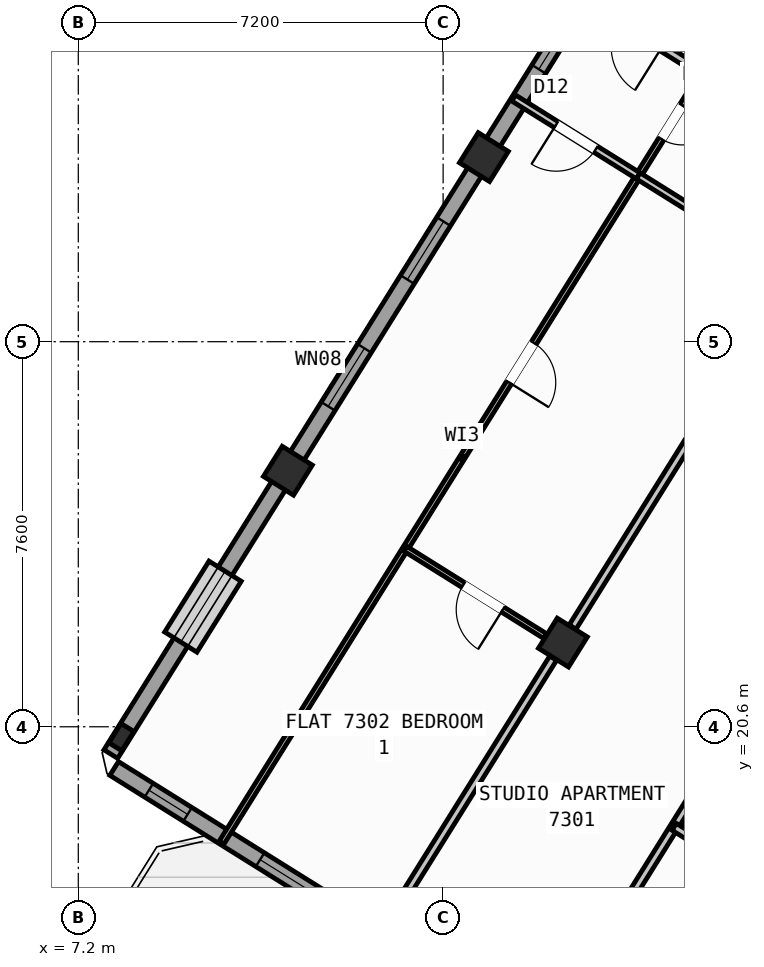
"""IFC4 building model, lengths in metres.
Left out: names, types, materials, properties, quantities, classifications, styles, units other than length and angle.
Written with IfcOpenShell. Run it as: python <this file> out.ifc"""

import sys

from ifc_helpers import new_model, si_unit, direction, frame, frame_2d, origin, origin_2d, place, context, subcontext, project, spatial, rectangle, hollow_rectangle, i_section, extrude, source, transform, mapped, element, fill, save


model = new_model("IFC4")
c1 = context("Model", 3, precision=1e-05, world=origin(), true_north=direction((0.0, 1.0)))
c2 = subcontext(c1, "Body", "Model", "MODEL_VIEW")
j1 = project(units=[si_unit("LENGTHUNIT", "METRE"), si_unit("PLANEANGLEUNIT", "RADIAN")], contexts=[c1])
p1 = place(None, origin())
s1 = spatial("IfcSite", under=j1, at=p1, CompositionType="ELEMENT")
p2 = place(p1, origin())
s2 = spatial("IfcBuilding", under=s1, at=p2, CompositionType="ELEMENT")
p3 = place(p2, frame((0.0, 0.0, 288.0)))
s3 = spatial("IfcBuildingStorey", under=s2, at=p3, CompositionType="ELEMENT", Elevation=288.0)
m1 = source(origin(), c2, "Body", "SweptSolid", [
    extrude(hollow_rectangle(XDim=0.7, YDim=0.7, WallThickness=0.028, at=origin_2d()), origin(), (0.0, 0.0, 1.0), 3.6),
])
for number, where, z_axis, x_axis in (
    (1, (16.764, 22.261, 0.0), (0.0, 0.0, 1.0), (-0.848, 0.53, 0.0)),
    (2, (15.205, 31.844, 0.0), (0.0, 0.0, 1.0), (-0.848, 0.53, 0.0)),
    (3, (11.336, 25.653, 0.0), (0.0, 0.0, 1.0), (-0.848, 0.53, 0.0)),
):
    element("IfcColumn", number, at=place(p3, frame(where, z_axis=z_axis, x_axis=x_axis)), inside=s3, PredefinedType="COLUMN", context=c2, shape_type="MappedRepresentation", body=[
        mapped(m1, transform((0.0, 0.0, 0.0), scale=1.0)),
    ])
m2 = source(origin(), c2, "Body", "SweptSolid", [
    extrude(i_section(OverallWidth=0.3, OverallDepth=0.45, WebThickness=0.014, FlangeThickness=0.026, at=origin_2d()), origin(), (0.0, 0.0, 1.0), 3.6),
])
p4 = place(p3, frame((8.051, 20.395, 0.0), z_axis=(0.0, 0.0, 1.0), x_axis=(-0.848048096156, 0.529919264233, 0.0)))
e4 = element("IfcColumn", 4, at=p4, inside=s3, PredefinedType="COLUMN", context=c2, shape_type="MappedRepresentation", body=[
    mapped(m2, transform((0.0, 0.0, 0.0), scale=1.0)),
])
p5 = place(p3, frame((29.268, 6.429, 0.0), z_axis=(0.0, 0.0, 1.0), x_axis=(-0.848048398186, 0.529918780885, 0.0)))
e5 = element("IfcWall", 5, at=p5, inside=s3, PredefinedType="STANDARD", context=c2, shape_type="SweptSolid", body=[
    extrude(rectangle(XDim=25.188, YDim=0.32, at=frame_2d((12.594, 0.0))), origin(), (0.0, 0.0, 1.0), 3.35),
])
p6 = place(p5, frame((16.362, 0.0, 0.0)))
e6 = element("IfcOpeningElement", 6, at=p6, cuts=e5, PredefinedType="OPENING", context=c2, shape_type="SweptSolid", body=[
    extrude(rectangle(XDim=1.2, YDim=2.15, at=frame_2d((0.6, 1.075))), frame((0.0, 0.17, 0.0), z_axis=(0.0, -1.0, 0.0), x_axis=(1.0, 0.0, 0.0)), (0.0, 0.0, 1.0), 0.34),
])
p7 = place(p5, frame((3.859, 0.0, 0.9)))
e7 = element("IfcOpeningElement", 7, at=p7, cuts=e5, PredefinedType="OPENING", context=c2, shape_type="SweptSolid", body=[
    extrude(rectangle(XDim=1.65, YDim=1.45, at=frame_2d((0.825, 0.725))), frame((0.0, 0.17, 0.0), z_axis=(0.0, -1.0, 0.0), x_axis=(1.0, 0.0, 0.0)), (0.0, 0.0, 1.0), 0.34),
])
p8 = place(p5, frame((10.519, 0.0, 0.9)))
e8 = element("IfcOpeningElement", 8, at=p8, cuts=e5, PredefinedType="OPENING", context=c2, shape_type="SweptSolid", body=[
    extrude(rectangle(XDim=1.65, YDim=1.45, at=frame_2d((0.825, 0.725))), frame((0.0, 0.17, 0.0), z_axis=(0.0, -1.0, 0.0), x_axis=(1.0, 0.0, 0.0)), (0.0, 0.0, 1.0), 0.34),
])
p9 = place(p5, frame((19.841, 0.0, 0.95)))
e9 = element("IfcOpeningElement", 9, at=p9, cuts=e5, PredefinedType="OPENING", context=c2, shape_type="SweptSolid", body=[
    extrude(rectangle(XDim=1.95, YDim=1.35, at=frame_2d((0.975, 0.675))), frame((0.0, 0.17, 0.0), z_axis=(0.0, -1.0, 0.0), x_axis=(1.0, 0.0, 0.0)), (0.0, 0.0, 1.0), 0.34),
])
p10 = place(p5, frame((23.478, 0.0, 1.0)))
e10 = element("IfcOpeningElement", 10, at=p10, cuts=e5, PredefinedType="OPENING", context=c2, shape_type="SweptSolid", body=[
    extrude(rectangle(XDim=0.9, YDim=1.25, at=frame_2d((0.45, 0.625))), frame((0.0, 0.17, 0.0), z_axis=(0.0, -1.0, 0.0), x_axis=(1.0, 0.0, 0.0)), (0.0, 0.0, 1.0), 0.34),
])
p11 = place(p3, frame((7.842, 20.061, 0.0), z_axis=(0.0, 0.0, 1.0), x_axis=(0.529915577903, 0.84805039962, 0.0)))
e11 = element("IfcWall", 11, at=p11, inside=s3, PredefinedType="STANDARD", context=c2, shape_type="SweptSolid", body=[
    extrude(rectangle(XDim=21.587, YDim=0.32, at=frame_2d((10.794, 0.0))), origin(), (0.0, 0.0, 1.0), 2.875),
])
p12 = place(p11, frame((2.606, 0.0, 0.9)))
e12 = element("IfcOpeningElement", 12, at=p12, cuts=e11, PredefinedType="OPENING", context=c2, shape_type="SweptSolid", body=[
    extrude(rectangle(XDim=1.65, YDim=1.45, at=frame_2d((0.825, 0.725))), frame((0.0, 0.17, 0.0), z_axis=(0.0, -1.0, 0.0), x_axis=(1.0, 0.0, 0.0)), (0.0, 0.0, 1.0), 0.34),
])
p13 = place(p11, frame((8.094, 0.0, 0.9)))
e13 = element("IfcOpeningElement", 13, at=p13, cuts=e11, PredefinedType="OPENING", context=c2, shape_type="SweptSolid", body=[
    extrude(rectangle(XDim=1.35, YDim=1.45, at=frame_2d((0.675, 0.725))), frame((0.0, 0.17, 0.0), z_axis=(0.0, -1.0, 0.0), x_axis=(1.0, 0.0, 0.0)), (0.0, 0.0, 1.0), 0.34),
])
p14 = place(p11, frame((11.044, 0.0, 0.9)))
e14 = element("IfcOpeningElement", 14, at=p14, cuts=e11, PredefinedType="OPENING", context=c2, shape_type="SweptSolid", body=[
    extrude(rectangle(XDim=1.35, YDim=1.45, at=frame_2d((0.675, 0.725))), frame((0.0, 0.17, 0.0), z_axis=(0.0, -1.0, 0.0), x_axis=(1.0, 0.0, 0.0)), (0.0, 0.0, 1.0), 0.34),
])
p15 = place(p11, frame((15.939, 0.0, 1.0)))
e15 = element("IfcOpeningElement", 15, at=p15, cuts=e11, PredefinedType="OPENING", context=c2, shape_type="SweptSolid", body=[
    extrude(rectangle(XDim=0.9, YDim=1.25, at=frame_2d((0.45, 0.625))), frame((0.0, 0.17, 0.0), z_axis=(0.0, -1.0, 0.0), x_axis=(1.0, 0.0, 0.0)), (0.0, 0.0, 1.0), 0.34),
])
p16 = place(p3, frame((21.206, 17.292, 0.0), z_axis=(0.0, 0.0, 1.0), x_axis=(-0.848050851465, 0.529914854792, 0.0)))
e16 = element("IfcWall", 16, at=p16, inside=s3, PredefinedType="PARTITIONING", context=c2, shape_type="SweptSolid", body=[
    extrude(rectangle(XDim=2.61, YDim=0.16, at=frame_2d((1.305, 0.0))), origin(), (0.0, 0.0, 1.0), 3.34),
])
p17 = place(p3, frame((25.807, 29.582, 0.0), z_axis=(0.0, 0.0, 1.0), x_axis=(-0.529918119251, -0.84804881162, 0.0)))
e17 = element("IfcWall", 17, at=p17, inside=s3, PredefinedType="PARTITIONING", context=c2, shape_type="SweptSolid", body=[
    extrude(rectangle(XDim=17.65, YDim=0.16, at=frame_2d((8.825, 0.0))), origin(), (0.0, 0.0, 1.0), 3.34),
])
p18 = place(p3, frame((26.973, 31.447, 0.0), z_axis=(0.0, 0.0, 1.0), x_axis=(-0.84805406617, 0.529909710094, 0.0)))
e18 = element("IfcWall", 18, at=p18, inside=s3, PredefinedType="PARTITIONING", context=c2, shape_type="SweptSolid", body=[
    extrude(rectangle(XDim=10.33, YDim=0.16, at=frame_2d((5.165, 0.0))), origin(), (0.0, 0.0, 1.0), 3.34),
])
p19 = place(p18, frame((1.459, 0.0, 0.0)))
e19 = element("IfcOpeningElement", 19, at=p19, cuts=e18, PredefinedType="OPENING", context=c2, shape_type="SweptSolid", body=[
    extrude(rectangle(XDim=1.0, YDim=2.1, at=frame_2d((0.5, 1.05))), frame((0.0, 0.09, 0.0), z_axis=(0.0, -1.0, 0.0), x_axis=(1.0, 0.0, 0.0)), (0.0, 0.0, 1.0), 0.18),
])
p20 = place(p18, frame((6.614, 0.0, 0.0)))
e20 = element("IfcOpeningElement", 20, at=p20, cuts=e18, PredefinedType="OPENING", context=c2, shape_type="SweptSolid", body=[
    extrude(rectangle(XDim=1.0, YDim=2.1, at=frame_2d((0.5, 1.05))), frame((0.0, 0.09, 0.0), z_axis=(0.0, -1.0, 0.0), x_axis=(1.0, 0.0, 0.0)), (0.0, 0.0, 1.0), 0.18),
])
p21 = place(p3, frame((25.807, 29.582, 0.0), z_axis=(0.0, 0.0, 1.0), x_axis=(-0.848060702647, 0.529899089097, 0.0)))
e21 = element("IfcWall", 21, at=p21, inside=s3, PredefinedType="PARTITIONING", context=c2, shape_type="SweptSolid", body=[
    extrude(rectangle(XDim=10.33, YDim=0.16, at=frame_2d((5.165, 0.0))), origin(), (0.0, 0.0, 1.0), 3.34),
])
p22 = place(p21, frame((2.22, 0.0, 0.0)))
e22 = element("IfcOpeningElement", 22, at=p22, cuts=e21, PredefinedType="OPENING", context=c2, shape_type="SweptSolid", body=[
    extrude(rectangle(XDim=0.86, YDim=2.05, at=frame_2d((0.43, 1.025))), frame((0.0, 0.09, 0.0), z_axis=(0.0, -1.0, 0.0), x_axis=(1.0, 0.0, 0.0)), (0.0, 0.0, 1.0), 0.18),
])
p23 = place(p21, frame((8.36, 0.0, 0.0)))
e23 = element("IfcOpeningElement", 23, at=p23, cuts=e21, PredefinedType="OPENING", context=c2, shape_type="SweptSolid", body=[
    extrude(rectangle(XDim=1.0, YDim=2.1, at=frame_2d((0.5, 1.05))), frame((0.0, 0.09, 0.0), z_axis=(0.0, -1.0, 0.0), x_axis=(1.0, 0.0, 0.0)), (0.0, 0.0, 1.0), 0.18),
])
p24 = place(p3, frame((20.44, 28.145, 0.0), z_axis=(0.0, 0.0, 1.0), x_axis=(-0.529938869374, -0.84803584519, 0.0)))
e24 = element("IfcWall", 24, at=p24, inside=s3, PredefinedType="PARTITIONING", context=c2, shape_type="SweptSolid", body=[
    extrude(rectangle(XDim=6.576, YDim=0.16, at=frame_2d((3.288, 0.0))), origin(), (0.0, 0.0, 1.0), 2.875),
])
p25 = place(p3, frame((16.572, 21.954, 0.0), z_axis=(0.0, 0.0, 1.0), x_axis=(-0.529904903214, -0.848057069748, 0.0)))
e25 = element("IfcWall", 25, at=p25, inside=s3, PredefinedType="PARTITIONING", context=c2, shape_type="SweptSolid", body=[
    extrude(rectangle(XDim=5.601, YDim=0.16, at=frame_2d((2.801, 0.0))), origin(), (0.0, 0.0, 1.0), 2.875),
])
p26 = place(p3, frame((19.523, 33.508, 0.0), z_axis=(0.0, 0.0, 1.0), x_axis=(-0.529910765222, -0.848053406869, 0.0)))
e26 = element("IfcWall", 26, at=p26, inside=s3, PredefinedType="PARTITIONING", context=c2, shape_type="SweptSolid", body=[
    extrude(rectangle(XDim=17.92, YDim=0.11, at=frame_2d((8.96, 0.0))), origin(), (0.0, 0.0, 1.0), 3.34),
])
p27 = place(p26, frame((0.76, 0.0, 0.0)))
e27 = element("IfcOpeningElement", 27, at=p27, cuts=e26, PredefinedType="OPENING", context=c2, shape_type="SweptSolid", body=[
    extrude(rectangle(XDim=0.78, YDim=2.05, at=frame_2d((0.39, 1.025))), frame((0.0, 0.065, 0.0), z_axis=(0.0, -1.0, 0.0), x_axis=(1.0, 0.0, 0.0)), (0.0, 0.0, 1.0), 0.13),
])
p28 = place(p26, frame((6.289, 0.0, 0.0)))
e28 = element("IfcOpeningElement", 28, at=p28, cuts=e26, PredefinedType="OPENING", context=c2, shape_type="SweptSolid", body=[
    extrude(rectangle(XDim=0.92, YDim=2.08, at=frame_2d((0.46, 1.04))), frame((0.0, 0.065, 0.0), z_axis=(0.0, -1.0, 0.0), x_axis=(1.0, 0.0, 0.0)), (0.0, 0.0, 1.0), 0.13),
])
p29 = place(p3, frame((18.251, 31.473, 0.0), z_axis=(0.0, 0.0, 1.0), x_axis=(-0.848059786386, 0.529900555496, 0.0)))
e29 = element("IfcWall", 29, at=p29, inside=s3, PredefinedType="PLUMBINGWALL", context=c2, shape_type="SweptSolid", body=[
    extrude(rectangle(XDim=2.9, YDim=0.14, at=frame_2d((1.45, 0.0))), origin(), (0.0, 0.0, 1.0), 3.34),
])
p30 = place(p29, frame((0.99, 0.0, 0.0)))
e30 = element("IfcOpeningElement", 30, at=p30, cuts=e29, PredefinedType="OPENING", context=c2, shape_type="SweptSolid", body=[
    extrude(rectangle(XDim=0.92, YDim=2.08, at=frame_2d((0.46, 1.04))), frame((0.0, 0.08, 0.0), z_axis=(0.0, -1.0, 0.0), x_axis=(1.0, 0.0, 0.0)), (0.0, 0.0, 1.0), 0.16),
])
p31 = place(p3, frame((21.321, 29.554, 0.0), z_axis=(0.0, 0.0, 1.0), x_axis=(-0.848021036626, 0.529962566074, 0.0)))
e31 = element("IfcWall", 31, at=p31, inside=s3, PredefinedType="PLUMBINGWALL", context=c2, shape_type="SweptSolid", body=[
    extrude(rectangle(XDim=3.62, YDim=0.14, at=frame_2d((1.81, 0.0))), origin(), (0.0, 0.0, 1.0), 3.34),
])
p32 = place(p3, frame((16.416, 22.388, 0.0), z_axis=(0.0, 0.0, 1.0), x_axis=(-0.84806986598, 0.529884423641, 0.0)))
e32 = element("IfcWall", 32, at=p32, inside=s3, PredefinedType="PARTITIONING", context=c2, shape_type="SweptSolid", body=[
    extrude(rectangle(XDim=3.258, YDim=0.11, at=frame_2d((1.629, 0.0))), origin(), (0.0, 0.0, 1.0), 2.875),
])
p33 = place(p32, frame((0.988, 0.0, 0.0)))
e33 = element("IfcOpeningElement", 33, at=p33, cuts=e32, PredefinedType="OPENING", context=c2, shape_type="SweptSolid", body=[
    extrude(rectangle(XDim=0.92, YDim=2.08, at=frame_2d((0.46, 1.04))), frame((0.0, 0.065, 0.0), z_axis=(0.0, -1.0, 0.0), x_axis=(1.0, 0.0, 0.0)), (0.0, 0.0, 1.0), 0.13),
])
p34 = place(p3, frame((32.164, 10.374, 0.0), z_axis=(0.0, 0.0, 1.0), x_axis=(-0.848044107957, 0.529925646633, 0.0)))
e34 = element("IfcWall", 34, at=p34, inside=s3, PredefinedType="PARTITIONING", context=c2, shape_type="SweptSolid", body=[
    extrude(rectangle(XDim=15.57, YDim=0.16, at=frame_2d((7.785, 0.0))), origin(), (0.0, 0.0, 1.0), 3.34),
])
p35 = place(p34, frame((10.83, 0.0, 0.0)))
e35 = element("IfcOpeningElement", 35, at=p35, cuts=e34, PredefinedType="OPENING", context=c2, shape_type="SweptSolid", body=[
    extrude(rectangle(XDim=1.0, YDim=2.1, at=frame_2d((0.5, 1.05))), frame((0.0, 0.09, 0.0), z_axis=(0.0, -1.0, 0.0), x_axis=(1.0, 0.0, 0.0)), (0.0, 0.0, 1.0), 0.18),
])
m3 = source(origin(), c2, "Body", "SweptSolid", [
    extrude(rectangle(XDim=1.95, YDim=1.35, at=frame_2d((0.975, 0.675))), frame((0.0, 0.03, 0.0), z_axis=(0.0, -1.0, 0.0), x_axis=(1.0, 0.0, 0.0)), (0.0, 0.0, 1.0), 0.06),
])
p36 = place(p9, origin())
e36 = element("IfcWindow", 36, at=p36, inside=s3, PartitioningType="SINGLE_PANEL", PredefinedType="WINDOW", context=c2, shape_type="MappedRepresentation", body=[
    mapped(m3, transform((0.0, 0.0, 0.0), scale=1.0)),
])
fill(e9, e36)
m4 = source(origin(), c2, "Body", "SweptSolid", [
    extrude(rectangle(XDim=0.9, YDim=1.25, at=frame_2d((0.45, 0.625))), frame((0.0, 0.03, 0.0), z_axis=(0.0, -1.0, 0.0), x_axis=(1.0, 0.0, 0.0)), (0.0, 0.0, 1.0), 0.06),
])
p37 = place(p10, origin())
e37 = element("IfcWindow", 37, at=p37, inside=s3, PartitioningType="SINGLE_PANEL", PredefinedType="WINDOW", context=c2, shape_type="MappedRepresentation", body=[
    mapped(m4, transform((0.0, 0.0, 0.0), scale=1.0)),
])
fill(e10, e37)
m5 = source(origin(), c2, "Body", "SweptSolid", [
    extrude(rectangle(XDim=1.65, YDim=1.45, at=frame_2d((0.825, 0.725))), frame((0.0, 0.03, 0.0), z_axis=(0.0, -1.0, 0.0), x_axis=(1.0, 0.0, 0.0)), (0.0, 0.0, 1.0), 0.06),
])
p38 = place(p12, origin())
e38 = element("IfcWindow", 38, at=p38, inside=s3, PartitioningType="SINGLE_PANEL", PredefinedType="WINDOW", context=c2, shape_type="MappedRepresentation", body=[
    mapped(m5, transform((0.0, 0.0, 0.0), scale=1.0)),
])
fill(e12, e38)
m6 = source(origin(), c2, "Body", "SweptSolid", [
    extrude(rectangle(XDim=1.35, YDim=1.45, at=frame_2d((0.675, 0.725))), frame((0.0, 0.03, 0.0), z_axis=(0.0, -1.0, 0.0), x_axis=(1.0, 0.0, 0.0)), (0.0, 0.0, 1.0), 0.06),
])
p39 = place(p13, origin())
e39 = element("IfcWindow", 39, at=p39, inside=s3, PartitioningType="SINGLE_PANEL", PredefinedType="WINDOW", context=c2, shape_type="MappedRepresentation", body=[
    mapped(m6, transform((0.0, 0.0, 0.0), scale=1.0)),
])
fill(e13, e39)
p40 = place(p14, origin())
e40 = element("IfcWindow", 40, at=p40, inside=s3, PartitioningType="SINGLE_PANEL", PredefinedType="WINDOW", context=c2, shape_type="MappedRepresentation", body=[
    mapped(m6, transform((0.0, 0.0, 0.0), scale=1.0)),
])
fill(e14, e40)
p41 = place(p15, origin())
e41 = element("IfcWindow", 41, at=p41, inside=s3, PartitioningType="SINGLE_PANEL", PredefinedType="WINDOW", context=c2, shape_type="MappedRepresentation", body=[
    mapped(m4, transform((0.0, 0.0, 0.0), scale=1.0)),
])
fill(e15, e41)
m7 = source(origin(), c2, "Body", "SweptSolid", [
    extrude(rectangle(XDim=0.92, YDim=2.08, at=frame_2d((0.46, 1.04))), frame((0.0, 0.025, 0.0), z_axis=(0.0, -1.0, 0.0), x_axis=(1.0, 0.0, 0.0)), (0.0, 0.0, 1.0), 0.05),
])
p42 = place(p30, origin())
e42 = element("IfcDoor", 42, at=p42, inside=s3, OperationType="SINGLE_SWING_RIGHT", PredefinedType="DOOR", context=c2, shape_type="MappedRepresentation", body=[
    mapped(m7, transform((0.0, 0.0, 0.0), scale=1.0)),
])
fill(e30, e42)
m8 = source(origin(), c2, "Body", "SweptSolid", [
    extrude(rectangle(XDim=0.78, YDim=2.05, at=frame_2d((0.39, 1.025))), frame((0.0, 0.025, 0.0), z_axis=(0.0, -1.0, 0.0), x_axis=(1.0, 0.0, 0.0)), (0.0, 0.0, 1.0), 0.05),
])
p43 = place(p27, origin())
e43 = element("IfcDoor", 43, at=p43, inside=s3, OperationType="SINGLE_SWING_LEFT", PredefinedType="DOOR", context=c2, shape_type="MappedRepresentation", body=[
    mapped(m8, transform((0.0, 0.0, 0.0), scale=1.0)),
])
fill(e27, e43)
p44 = place(p28, origin())
e44 = element("IfcDoor", 44, at=p44, inside=s3, OperationType="SINGLE_SWING_RIGHT", PredefinedType="DOOR", context=c2, shape_type="MappedRepresentation", body=[
    mapped(m7, transform((0.0, 0.0, 0.0), scale=1.0)),
])
fill(e28, e44)
p45 = place(p33, origin())
e45 = element("IfcDoor", 45, at=p45, inside=s3, OperationType="SINGLE_SWING_LEFT", PredefinedType="DOOR", context=c2, shape_type="MappedRepresentation", body=[
    mapped(m7, transform((0.0, 0.0, 0.0), scale=1.0)),
])
fill(e33, e45)
save(model, sys.argv[1])
